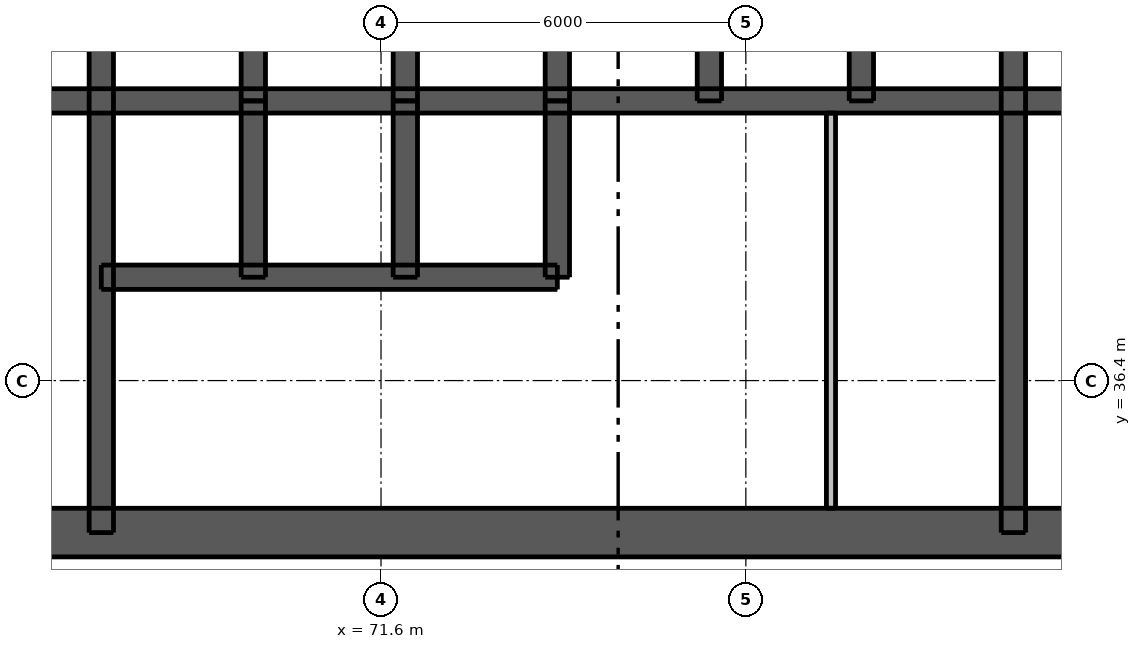
"""IFC4 building model, lengths in metres.
Left out: names, types, materials, properties, quantities, classifications, styles, units other than length and angle.
Written with IfcOpenShell. Run it as: python <this file> out.ifc"""

import sys

from ifc_helpers import new_model, si_unit, direction, frame, frame_2d, origin, place, context, subcontext, project, spatial, rectangle, extrude, element, fill, save


model = new_model("IFC4")
c1 = context("Model", 3, precision=1e-05, world=origin(), true_north=direction((0.0, 1.0)))
c2 = subcontext(c1, "Body", "Model", "MODEL_VIEW")
j1 = project(units=[si_unit("LENGTHUNIT", "METRE"), si_unit("PLANEANGLEUNIT", "RADIAN")], contexts=[c1])
p1 = place(None, origin())
s1 = spatial("IfcSite", under=j1, at=p1, CompositionType="ELEMENT")
p2 = place(p1, origin())
s2 = spatial("IfcBuilding", under=s1, at=p2, CompositionType="ELEMENT")
p3 = place(p2, frame((0.0, 0.0, 115.0)))
s3 = spatial("IfcBuildingStorey", under=s2, at=p3, CompositionType="ELEMENT", Elevation=115.0)
p4 = place(p3, frame((62.5, 33.9, 0.0), z_axis=(0.0, 0.0, 1.0), x_axis=(1.0, 0.0, 0.0)))
e1 = element("IfcWall", 1, at=p4, inside=s3, PredefinedType="SHEAR", context=c2, shape_type="SweptSolid", body=[
    extrude(rectangle(XDim=24.0, YDim=0.8, at=frame_2d((12.0, 0.0))), origin(), (0.0, 0.0, 1.0), 3.05),
])
p5 = place(p4, frame((2.0, 0.0, 0.0)))
e2 = element("IfcOpeningElement", 2, at=p5, cuts=e1, PredefinedType="OPENING", context=c2, shape_type="SweptSolid", body=[
    extrude(rectangle(XDim=1.1, YDim=2.1, at=frame_2d((0.55, 1.05))), frame((0.0, 0.41, 0.0), z_axis=(0.0, -1.0, 0.0), x_axis=(1.0, 0.0, 0.0)), (0.0, 0.0, 1.0), 0.82),
])
p6 = place(p4, frame((20.9, 0.0, 0.0)))
e3 = element("IfcOpeningElement", 3, at=p6, cuts=e1, PredefinedType="OPENING", context=c2, shape_type="SweptSolid", body=[
    extrude(rectangle(XDim=1.1, YDim=2.1, at=frame_2d((0.55, 1.05))), frame((0.0, 0.41, 0.0), z_axis=(0.0, -1.0, 0.0), x_axis=(1.0, 0.0, 0.0)), (0.0, 0.0, 1.0), 0.82),
])
p7 = place(p4, frame((8.0, 0.0, 0.0)))
e4 = element("IfcOpeningElement", 4, at=p7, cuts=e1, PredefinedType="OPENING", context=c2, shape_type="SweptSolid", body=[
    extrude(rectangle(XDim=1.1, YDim=2.1, at=frame_2d((0.55, 1.05))), frame((0.0, 0.41, 0.0), z_axis=(0.0, -1.0, 0.0), x_axis=(1.0, 0.0, 0.0)), (0.0, 0.0, 1.0), 0.82),
])
p8 = place(p4, frame((17.488, 0.0, 0.0)))
e5 = element("IfcOpeningElement", 5, at=p8, cuts=e1, PredefinedType="OPENING", context=c2, shape_type="SweptSolid", body=[
    extrude(rectangle(XDim=0.9, YDim=2.1, at=frame_2d((0.45, 1.05))), frame((0.0, 0.41, 0.0), z_axis=(0.0, -1.0, 0.0), x_axis=(1.0, 0.0, 0.0)), (0.0, 0.0, 1.0), 0.82),
])
p9 = place(p3, frame((62.9, 41.0, 0.0), z_axis=(0.0, 0.0, 1.0), x_axis=(1.0, 0.0, 0.0)))
e6 = element("IfcWall", 6, at=p9, inside=s3, PredefinedType="SHEAR", context=c2, shape_type="SweptSolid", body=[
    extrude(rectangle(XDim=23.2, YDim=0.4, at=frame_2d((11.6, 0.0))), origin(), (0.0, 0.0, 1.0), 3.05),
])
p10 = place(p3, frame((67.0, 33.9, 0.0), z_axis=(0.0, 0.0, 1.0), x_axis=(0.0, 1.0, 0.0)))
e7 = element("IfcWall", 7, at=p10, inside=s3, PredefinedType="SHEAR", context=c2, shape_type="SweptSolid", body=[
    extrude(rectangle(XDim=10.0, YDim=0.4, at=frame_2d((5.0, 0.0))), origin(), (0.0, 0.0, 1.0), 3.05),
])
p11 = place(p10, frame((0.6, 0.0, 0.0)))
e8 = element("IfcOpeningElement", 8, at=p11, cuts=e7, PredefinedType="OPENING", context=c2, shape_type="SweptSolid", body=[
    extrude(rectangle(XDim=1.1, YDim=2.1, at=frame_2d((0.55, 1.05))), frame((0.0, 0.21, 0.0), z_axis=(0.0, -1.0, 0.0), x_axis=(1.0, 0.0, 0.0)), (0.0, 0.0, 1.0), 0.42),
])
p12 = place(p3, frame((82.0, 33.9, 0.0), z_axis=(0.0, 0.0, 1.0), x_axis=(0.0, 1.0, 0.0)))
e9 = element("IfcWall", 9, at=p12, inside=s3, PredefinedType="SHEAR", context=c2, shape_type="SweptSolid", body=[
    extrude(rectangle(XDim=10.0, YDim=0.4, at=frame_2d((5.0, 0.0))), origin(), (0.0, 0.0, 1.0), 3.05),
])
for number, where, z_axis, x_axis in (
    (10, (69.5, 41.0, 0.0), (0.0, 0.0, 1.0), (0.0, 1.0, 0.0)),
    (11, (72.0, 41.0, 0.0), (0.0, 0.0, 1.0), (0.0, 1.0, 0.0)),
    (12, (74.5, 41.0, 0.0), (0.0, 0.0, 1.0), (0.0, 1.0, 0.0)),
    (13, (77.0, 41.0, 0.0), (0.0, 0.0, 1.0), (0.0, 1.0, 0.0)),
    (14, (79.5, 41.0, 0.0), (0.0, 0.0, 1.0), (0.0, 1.0, 0.0)),
):
    element("IfcWall", number, at=place(p3, frame(where, z_axis=z_axis, x_axis=x_axis)), inside=s3, PredefinedType="SHEAR", context=c2, shape_type="SweptSolid", body=[
        extrude(rectangle(XDim=2.9, YDim=0.4, at=frame_2d((1.45, 0.0))), origin(), (0.0, 0.0, 1.0), 3.05),
    ])
p13 = place(p3, frame((67.0, 38.1, 0.0), z_axis=(0.0, 0.0, 1.0), x_axis=(1.0, 0.0, 0.0)))
e15 = element("IfcWall", 15, at=p13, inside=s3, PredefinedType="SHEAR", context=c2, shape_type="SweptSolid", body=[
    extrude(rectangle(XDim=7.5, YDim=0.4, at=frame_2d((3.75, 0.0))), origin(), (0.0, 0.0, 1.0), 3.05),
])
p14 = place(p13, frame((0.7, 0.0, 0.0)))
e16 = element("IfcOpeningElement", 16, at=p14, cuts=e15, PredefinedType="OPENING", context=c2, shape_type="SweptSolid", body=[
    extrude(rectangle(XDim=1.1, YDim=2.1, at=frame_2d((0.55, 1.05))), frame((0.0, 0.21, 0.0), z_axis=(0.0, -1.0, 0.0), x_axis=(1.0, 0.0, 0.0)), (0.0, 0.0, 1.0), 0.42),
])
p15 = place(p13, frame((3.2, 0.0, 0.0)))
e17 = element("IfcOpeningElement", 17, at=p15, cuts=e15, PredefinedType="OPENING", context=c2, shape_type="SweptSolid", body=[
    extrude(rectangle(XDim=1.1, YDim=2.1, at=frame_2d((0.55, 1.05))), frame((0.0, 0.21, 0.0), z_axis=(0.0, -1.0, 0.0), x_axis=(1.0, 0.0, 0.0)), (0.0, 0.0, 1.0), 0.42),
])
p16 = place(p13, frame((5.65, 0.0, 0.0)))
e18 = element("IfcOpeningElement", 18, at=p16, cuts=e15, PredefinedType="OPENING", context=c2, shape_type="SweptSolid", body=[
    extrude(rectangle(XDim=1.2, YDim=2.1, at=frame_2d((0.6, 1.05))), frame((0.0, 0.21, 0.0), z_axis=(0.0, -1.0, 0.0), x_axis=(1.0, 0.0, 0.0)), (0.0, 0.0, 1.0), 0.42),
])
for number, where, z_axis, x_axis in (
    (19, (69.5, 38.1, 0.0), (0.0, 0.0, 1.0), (0.0, 1.0, 0.0)),
    (20, (72.0, 38.1, 0.0), (0.0, 0.0, 1.0), (0.0, 1.0, 0.0)),
    (21, (74.5, 38.1, 0.0), (0.0, 0.0, 1.0), (0.0, 1.0, 0.0)),
):
    element("IfcWall", number, at=place(p3, frame(where, z_axis=z_axis, x_axis=x_axis)), inside=s3, PredefinedType="SHEAR", context=c2, shape_type="SweptSolid", body=[
        extrude(rectangle(XDim=2.9, YDim=0.4, at=frame_2d((1.45, 0.0))), origin(), (0.0, 0.0, 1.0), 3.05),
    ])
p17 = place(p3, frame((79.0, 34.3, 0.0), z_axis=(0.0, 0.0, 1.0), x_axis=(0.0, 1.0, 0.0)))
e22 = element("IfcWall", 22, at=p17, inside=s3, PredefinedType="PLUMBINGWALL", context=c2, shape_type="SweptSolid", body=[
    extrude(rectangle(XDim=6.5, YDim=0.15, at=frame_2d((3.25, 0.0))), origin(), (0.0, 0.0, 1.0), 3.05),
])
p18 = place(p7, origin())
e23 = element("IfcDoor", 23, at=p18, inside=s3, OperationType="SINGLE_SWING_LEFT", PredefinedType="DOOR", context=c2, shape_type="SweptSolid", body=[
    extrude(rectangle(XDim=1.1, YDim=2.1, at=frame_2d((0.55, 1.05))), frame((0.0, 0.388, 0.0), z_axis=(0.0, -1.0, 0.0), x_axis=(1.0, 0.0, 0.0)), (0.0, 0.0, 1.0), 0.05),
])
fill(e4, e23)
p19 = place(p11, origin())
e24 = element("IfcDoor", 24, at=p19, inside=s3, OperationType="SINGLE_SWING_RIGHT", PredefinedType="DOOR", context=c2, shape_type="SweptSolid", body=[
    extrude(rectangle(XDim=1.1, YDim=2.1, at=frame_2d((0.55, 1.05))), frame((0.0, -0.138, 0.0), z_axis=(0.0, -1.0, 0.0), x_axis=(1.0, 0.0, 0.0)), (0.0, 0.0, 1.0), 0.05),
])
fill(e8, e24)
p20 = place(p8, origin())
e25 = element("IfcDoor", 25, at=p20, inside=s3, OperationType="SINGLE_SWING_LEFT", PredefinedType="DOOR", context=c2, shape_type="SweptSolid", body=[
    extrude(rectangle(XDim=0.9, YDim=2.1, at=frame_2d((0.45, 1.05))), frame((0.0, 0.388, 0.0), z_axis=(0.0, -1.0, 0.0), x_axis=(1.0, 0.0, 0.0)), (0.0, 0.0, 1.0), 0.05),
])
fill(e5, e25)
p21 = place(p14, origin())
e26 = element("IfcDoor", 26, at=p21, inside=s3, OperationType="DOUBLE_DOOR_SLIDING", PredefinedType="DOOR", context=c2, shape_type="SweptSolid", body=[
    extrude(rectangle(XDim=1.1, YDim=2.1, at=frame_2d((0.55, 1.05))), frame((0.0, 0.025, 0.0), z_axis=(0.0, -1.0, 0.0), x_axis=(1.0, 0.0, 0.0)), (0.0, 0.0, 1.0), 0.05),
])
fill(e16, e26)
p22 = place(p15, origin())
e27 = element("IfcDoor", 27, at=p22, inside=s3, OperationType="DOUBLE_DOOR_SLIDING", PredefinedType="DOOR", context=c2, shape_type="SweptSolid", body=[
    extrude(rectangle(XDim=1.1, YDim=2.1, at=frame_2d((0.55, 1.05))), frame((0.0, 0.025, 0.0), z_axis=(0.0, -1.0, 0.0), x_axis=(1.0, 0.0, 0.0)), (0.0, 0.0, 1.0), 0.05),
])
fill(e17, e27)
p23 = place(p16, origin())
e28 = element("IfcDoor", 28, at=p23, inside=s3, OperationType="DOUBLE_DOOR_SLIDING", PredefinedType="DOOR", context=c2, shape_type="SweptSolid", body=[
    extrude(rectangle(XDim=1.2, YDim=2.1, at=frame_2d((0.6, 1.05))), frame((0.0, 0.025, 0.0), z_axis=(0.0, -1.0, 0.0), x_axis=(1.0, 0.0, 0.0)), (0.0, 0.0, 1.0), 0.05),
])
fill(e18, e28)
save(model, sys.argv[1])
